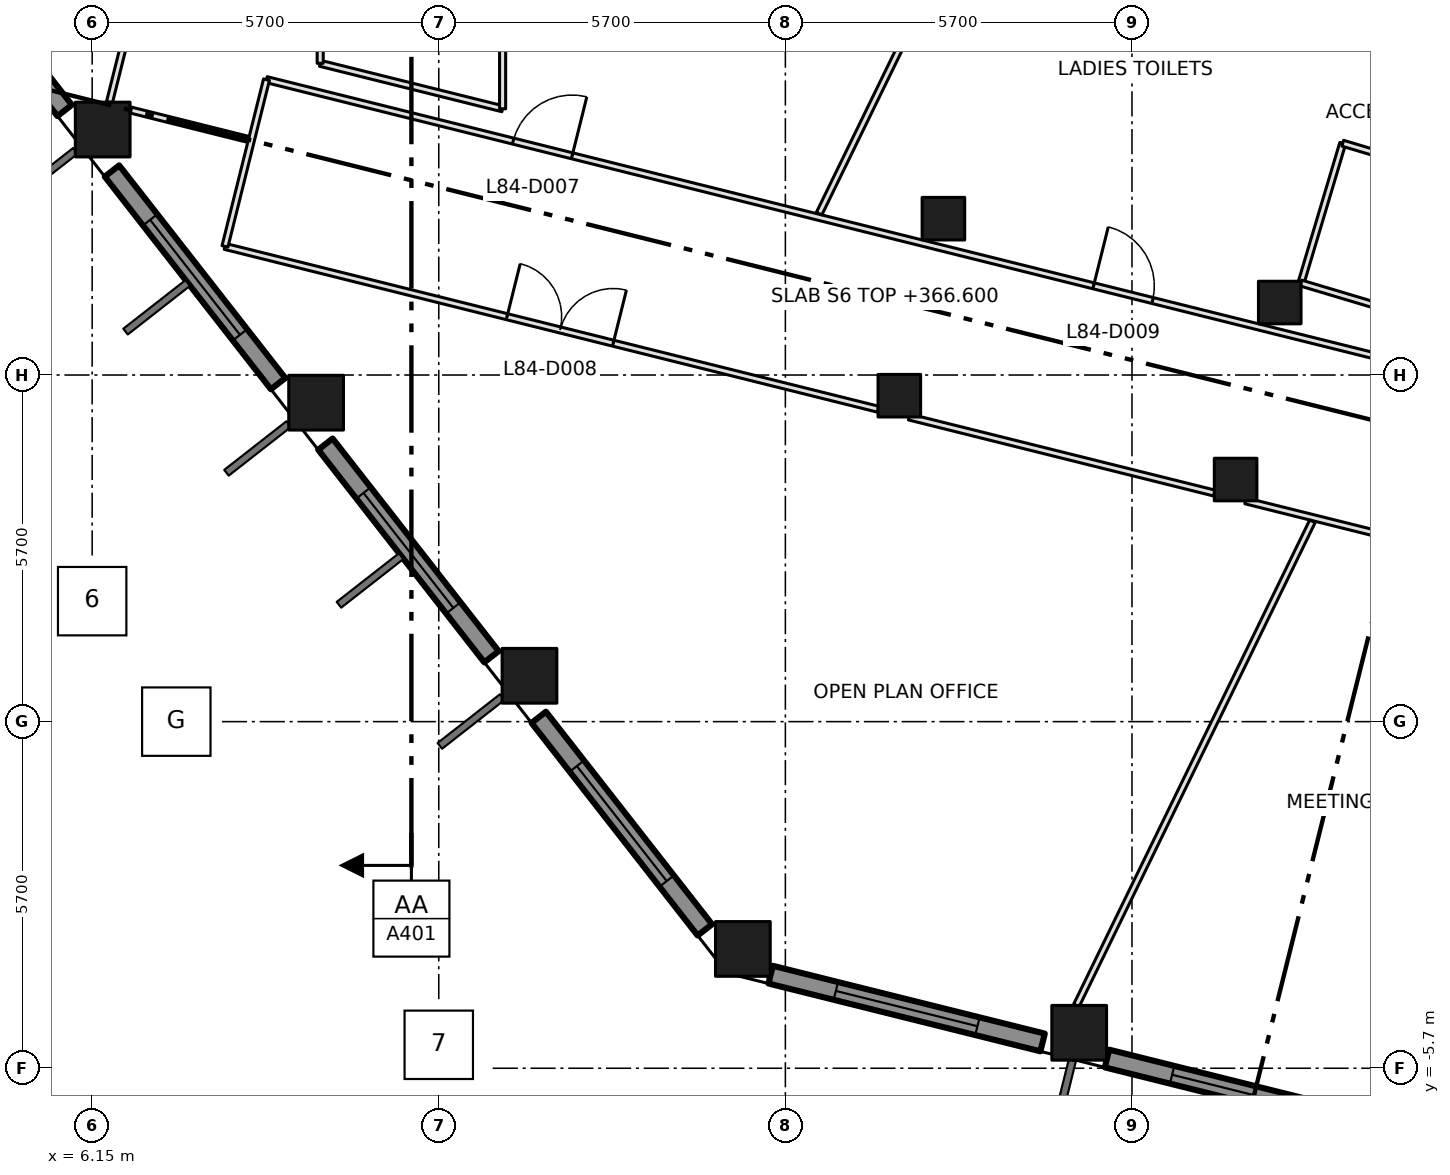
"""IFC4 building model, lengths in metres.
Left out: names, types, materials, properties, quantities, classifications, styles, units other than length and angle.
Written with IfcOpenShell. Run it as: python <this file> out.ifc"""

import sys

from ifc_helpers import new_model, si_unit, direction, frame, frame_2d, origin, origin_2d, place, context, subcontext, project, spatial, rectangle, extrude, element, fill, save


model = new_model("IFC4")
c1 = context("Model", 3, precision=1e-05, world=origin(), true_north=direction((0.0, 1.0)))
c2 = subcontext(c1, "Body", "Model", "MODEL_VIEW")
j1 = project(units=[si_unit("LENGTHUNIT", "METRE"), si_unit("PLANEANGLEUNIT", "RADIAN")], contexts=[c1])
p1 = place(None, origin())
s1 = spatial("IfcSite", under=j1, at=p1, CompositionType="ELEMENT")
p2 = place(p1, origin())
s2 = spatial("IfcBuilding", under=s1, at=p2, CompositionType="ELEMENT")
p3 = place(p2, frame((0.0, 0.0, 366.6)))
s3 = spatial("IfcBuildingStorey", under=s2, at=p3, CompositionType="ELEMENT", Elevation=366.6)
for number, where, z_axis, x_axis in (
    (1, (16.851, -3.738, 0.0), (0.0, 0.0, 1.0), (1.0, 0.0, 0.0)),
    (2, (13.342, 0.754, 0.0), (0.0, 0.0, 1.0), (1.0, 0.0, 0.0)),
    (3, (9.833, 5.245, 0.0), (0.0, 0.0, 1.0), (1.0, 0.0, 0.0)),
    (4, (6.323, 9.737, 0.0), (0.0, 0.0, 1.0), (1.0, 0.0, 0.0)),
    (5, (22.382, -5.117, 0.0), (0.0, 0.0, 1.0), (1.0, 0.0, 0.0)),
):
    element("IfcColumn", number, at=place(p3, frame(where, z_axis=z_axis, x_axis=x_axis)), inside=s3, PredefinedType="COLUMN", context=c2, shape_type="SweptSolid", body=[
        extrude(rectangle(XDim=0.9, YDim=0.9, at=origin_2d()), origin(), (0.0, 0.0, 1.0), 4.2),
    ])
for number, where, z_axis, x_axis in (
    (6, (19.424, 5.36, 0.0), (0.0, 0.0, 1.0), (1.0, 0.0, 0.0)),
    (7, (24.954, 3.981, 0.0), (0.0, 0.0, 1.0), (1.0, 0.0, 0.0)),
    (8, (20.149, 8.271, 0.0), (0.0, 0.0, 1.0), (1.0, 0.0, 0.0)),
    (9, (25.68, 6.892, 0.0), (0.0, 0.0, 1.0), (1.0, 0.0, 0.0)),
):
    element("IfcColumn", number, at=place(p3, frame(where, z_axis=z_axis, x_axis=x_axis)), inside=s3, PredefinedType="COLUMN", context=c2, shape_type="SweptSolid", body=[
        extrude(rectangle(XDim=0.7, YDim=0.7, at=origin_2d()), origin(), (0.0, 0.0, 1.0), 4.2),
    ])
p4 = place(p3, frame((2.967, 13.547, 0.0), z_axis=(0.0, 0.0, 1.0), x_axis=(0.615486001463, -0.788147817356, 0.0)))
e10 = element("IfcWall", 10, at=p4, inside=s3, PredefinedType="SOLIDWALL", context=c2, shape_type="SweptSolid", body=[
    extrude(rectangle(XDim=4.437, YDim=0.3, at=frame_2d((2.219, 0.0))), origin(), (0.0, 0.0, 1.0), 3.2),
])
p5 = place(p4, frame((1.018, 0.0, 0.8)))
e11 = element("IfcOpeningElement", 11, at=p5, cuts=e10, PredefinedType="OPENING", context=c2, shape_type="SweptSolid", body=[
    extrude(rectangle(XDim=2.4, YDim=2.1, at=frame_2d((1.2, 1.05))), frame((0.0, 0.16, 0.0), z_axis=(0.0, -1.0, 0.0), x_axis=(1.0, 0.0, 0.0)), (0.0, 0.0, 1.0), 0.32),
])
p6 = place(p3, frame((6.476, 9.055, 0.0), z_axis=(0.0, 0.0, 1.0), x_axis=(0.615649380255, -0.788020203162, 0.0)))
e12 = element("IfcWall", 12, at=p6, inside=s3, PredefinedType="SOLIDWALL", context=c2, shape_type="SweptSolid", body=[
    extrude(rectangle(XDim=4.438, YDim=0.3, at=frame_2d((2.219, 0.0))), origin(), (0.0, 0.0, 1.0), 3.2),
])
p7 = place(p6, frame((1.019, 0.0, 0.8)))
e13 = element("IfcOpeningElement", 13, at=p7, cuts=e12, PredefinedType="OPENING", context=c2, shape_type="SweptSolid", body=[
    extrude(rectangle(XDim=2.4, YDim=2.1, at=frame_2d((1.2, 1.05))), frame((0.0, 0.16, 0.0), z_axis=(0.0, -1.0, 0.0), x_axis=(1.0, 0.0, 0.0)), (0.0, 0.0, 1.0), 0.32),
])
p8 = place(p3, frame((9.986, 4.563, 0.0), z_axis=(0.0, 0.0, 1.0), x_axis=(0.615592779411, -0.788064419915, 0.0)))
e14 = element("IfcWall", 14, at=p8, inside=s3, PredefinedType="SOLIDWALL", context=c2, shape_type="SweptSolid", body=[
    extrude(rectangle(XDim=4.436, YDim=0.3, at=frame_2d((2.218, 0.0))), origin(), (0.0, 0.0, 1.0), 3.2),
])
p9 = place(p8, frame((1.018, 0.0, 0.8)))
e15 = element("IfcOpeningElement", 15, at=p9, cuts=e14, PredefinedType="OPENING", context=c2, shape_type="SweptSolid", body=[
    extrude(rectangle(XDim=2.4, YDim=2.1, at=frame_2d((1.2, 1.05))), frame((0.0, 0.16, 0.0), z_axis=(0.0, -1.0, 0.0), x_axis=(1.0, 0.0, 0.0)), (0.0, 0.0, 1.0), 0.32),
])
p10 = place(p3, frame((13.494, 0.071, 0.0), z_axis=(0.0, 0.0, 1.0), x_axis=(0.615763624226, -0.787930935476, 0.0)))
e16 = element("IfcWall", 16, at=p10, inside=s3, PredefinedType="SOLIDWALL", context=c2, shape_type="SweptSolid", body=[
    extrude(rectangle(XDim=4.437, YDim=0.3, at=frame_2d((2.219, 0.0))), origin(), (0.0, 0.0, 1.0), 3.2),
])
p11 = place(p10, frame((1.018, 0.0, 0.8)))
e17 = element("IfcOpeningElement", 17, at=p11, cuts=e16, PredefinedType="OPENING", context=c2, shape_type="SweptSolid", body=[
    extrude(rectangle(XDim=2.4, YDim=2.1, at=frame_2d((1.2, 1.05))), frame((0.0, 0.16, 0.0), z_axis=(0.0, -1.0, 0.0), x_axis=(1.0, 0.0, 0.0)), (0.0, 0.0, 1.0), 0.32),
])
p12 = place(p3, frame((17.308, -4.161, 0.0), z_axis=(0.0, 0.0, 1.0), x_axis=(0.970294992984, -0.241924836652, 0.0)))
e18 = element("IfcWall", 18, at=p12, inside=s3, PredefinedType="SOLIDWALL", context=c2, shape_type="SweptSolid", body=[
    extrude(rectangle(XDim=4.609, YDim=0.3, at=frame_2d((2.304, 0.0))), origin(), (0.0, 0.0, 1.0), 3.2),
])
p13 = place(p12, frame((1.105, 0.0, 0.8)))
e19 = element("IfcOpeningElement", 19, at=p13, cuts=e18, PredefinedType="OPENING", context=c2, shape_type="SweptSolid", body=[
    extrude(rectangle(XDim=2.4, YDim=2.1, at=frame_2d((1.2, 1.05))), frame((0.0, 0.16, 0.0), z_axis=(0.0, -1.0, 0.0), x_axis=(1.0, 0.0, 0.0)), (0.0, 0.0, 1.0), 0.32),
])
p14 = place(p3, frame((22.839, -5.54, 0.0), z_axis=(0.0, 0.0, 1.0), x_axis=(0.970282587769, -0.241974585177, 0.0)))
e20 = element("IfcWall", 20, at=p14, inside=s3, PredefinedType="SOLIDWALL", context=c2, shape_type="SweptSolid", body=[
    extrude(rectangle(XDim=4.608, YDim=0.3, at=frame_2d((2.304, 0.0))), origin(), (0.0, 0.0, 1.0), 3.2),
])
p15 = place(p14, frame((1.104, 0.0, 0.8)))
e21 = element("IfcOpeningElement", 21, at=p15, cuts=e20, PredefinedType="OPENING", context=c2, shape_type="SweptSolid", body=[
    extrude(rectangle(XDim=2.4, YDim=2.1, at=frame_2d((1.2, 1.05))), frame((0.0, 0.16, 0.0), z_axis=(0.0, -1.0, 0.0), x_axis=(1.0, 0.0, 0.0)), (0.0, 0.0, 1.0), 0.32),
])
p16 = place(p3, frame((8.334, 7.815, 0.0), z_axis=(0.0, 0.0, 1.0), x_axis=(0.970312231044, -0.241855688968, 0.0)))
e22 = element("IfcWall", 22, at=p16, inside=s3, PredefinedType="PARTITIONING", context=c2, shape_type="SweptSolid", body=[
    extrude(rectangle(XDim=11.069, YDim=0.1, at=frame_2d((5.534, 0.0))), origin(), (0.0, 0.0, 1.0), 3.9),
])
p17 = place(p16, frame((4.78, 0.0, 0.0)))
e23 = element("IfcOpeningElement", 23, at=p17, cuts=e22, PredefinedType="OPENING", context=c2, shape_type="SweptSolid", body=[
    extrude(rectangle(XDim=1.8, YDim=2.1, at=frame_2d((0.9, 1.05))), frame((0.0, 0.06, 0.0), z_axis=(0.0, -1.0, 0.0), x_axis=(1.0, 0.0, 0.0)), (0.0, 0.0, 1.0), 0.12),
])
p18 = place(p3, frame((9.017, 10.558, 0.0), z_axis=(0.0, 0.0, 1.0), x_axis=(0.970297621765, -0.241914293082, 0.0)))
e24 = element("IfcWall", 24, at=p18, inside=s3, PredefinedType="PARTITIONING", context=c2, shape_type="SweptSolid", body=[
    extrude(rectangle(XDim=19.879, YDim=0.1, at=frame_2d((9.94, 0.0))), origin(), (0.0, 0.0, 1.0), 3.9),
])
p19 = place(p18, frame((4.18, 0.0, 0.0)))
e25 = element("IfcOpeningElement", 25, at=p19, cuts=e24, PredefinedType="OPENING", context=c2, shape_type="SweptSolid", body=[
    extrude(rectangle(XDim=1.0, YDim=2.1, at=frame_2d((0.5, 1.05))), frame((0.0, 0.06, 0.0), z_axis=(0.0, -1.0, 0.0), x_axis=(1.0, 0.0, 0.0)), (0.0, 0.0, 1.0), 0.12),
])
p20 = place(p18, frame((14.018, 0.0, 0.0)))
e26 = element("IfcOpeningElement", 26, at=p20, cuts=e24, PredefinedType="OPENING", context=c2, shape_type="SweptSolid", body=[
    extrude(rectangle(XDim=1.0, YDim=2.1, at=frame_2d((0.5, 1.05))), frame((0.0, 0.06, 0.0), z_axis=(0.0, -1.0, 0.0), x_axis=(1.0, 0.0, 0.0)), (0.0, 0.0, 1.0), 0.12),
])
p21 = place(p3, frame((9.017, 10.558, 0.0), z_axis=(0.0, 0.0, 1.0), x_axis=(-0.241641419317, -0.970365613813, 0.0)))
e27 = element("IfcWall", 27, at=p21, inside=s3, PredefinedType="PARTITIONING", context=c2, shape_type="SweptSolid", body=[
    extrude(rectangle(XDim=2.827, YDim=0.1, at=frame_2d((1.414, 0.0))), origin(), (0.0, 0.0, 1.0), 3.9),
])
p22 = place(p3, frame((9.9, 10.826, 0.0), z_axis=(0.0, 0.0, 1.0), x_axis=(0.970290953223, -0.241941038466, 0.0)))
e28 = element("IfcWall", 28, at=p22, inside=s3, PredefinedType="PARTITIONING", context=c2, shape_type="SweptSolid", body=[
    extrude(rectangle(XDim=3.092, YDim=0.1, at=frame_2d((1.546, 0.0))), origin(), (0.0, 0.0, 1.0), 3.9),
])
p23 = place(p3, frame((9.9, 12.2, 0.0), z_axis=(0.0, 0.0, 1.0), x_axis=(0.0, -1.0, 0.0)))
e29 = element("IfcWall", 29, at=p23, inside=s3, PredefinedType="PARTITIONING", context=c2, shape_type="SweptSolid", body=[
    extrude(rectangle(XDim=1.374, YDim=0.1, at=frame_2d((0.687, 0.0))), origin(), (0.0, 0.0, 1.0), 3.9),
])
p24 = place(p3, frame((12.9, 10.078, 0.0), z_axis=(0.0, 0.0, 1.0), x_axis=(0.0, 1.0, 0.0)))
e30 = element("IfcWall", 30, at=p24, inside=s3, PredefinedType="PARTITIONING", context=c2, shape_type="SweptSolid", body=[
    extrude(rectangle(XDim=4.022, YDim=0.1, at=frame_2d((2.011, 0.0))), origin(), (0.0, 0.0, 1.0), 3.9),
])
p25 = place(p3, frame((19.586, 5.01, 0.0), z_axis=(0.0, 0.0, 1.0), x_axis=(0.970303347181, -0.241891327769, 0.0)))
e31 = element("IfcWall", 31, at=p25, inside=s3, PredefinedType="PARTITIONING", context=c2, shape_type="SweptSolid", body=[
    extrude(rectangle(XDim=5.172, YDim=0.1, at=frame_2d((2.586, 0.0))), origin(), (0.0, 0.0, 1.0), 3.9),
])
p26 = place(p3, frame((25.118, 3.631, 0.0), z_axis=(0.0, 0.0, 1.0), x_axis=(0.970281210621, -0.241980107272, 0.0)))
e32 = element("IfcWall", 32, at=p26, inside=s3, PredefinedType="PARTITIONING", context=c2, shape_type="SweptSolid", body=[
    extrude(rectangle(XDim=5.171, YDim=0.1, at=frame_2d((2.585, 0.0))), origin(), (0.0, 0.0, 1.0), 3.9),
])
p27 = place(p26, frame((2.629, 0.0, 0.0)))
e33 = element("IfcOpeningElement", 33, at=p27, cuts=e32, PredefinedType="OPENING", context=c2, shape_type="SweptSolid", body=[
    extrude(rectangle(XDim=1.0, YDim=2.1, at=frame_2d((0.5, 1.05))), frame((0.0, 0.06, 0.0), z_axis=(0.0, -1.0, 0.0), x_axis=(1.0, 0.0, 0.0)), (0.0, 0.0, 1.0), 0.12),
])
p28 = place(p3, frame((6.922, 12.138, 0.0), z_axis=(0.0, 0.0, 1.0), x_axis=(-0.24222136375, -0.97022101139, 0.0)))
e34 = element("IfcWall", 34, at=p28, inside=s3, PredefinedType="PARTITIONING", context=c2, shape_type="SweptSolid", body=[
    extrude(rectangle(XDim=2.011, YDim=0.1, at=frame_2d((1.005, 0.0))), origin(), (0.0, 0.0, 1.0), 3.9),
])
p29 = place(p3, frame((8.72, 9.574, 0.0), z_axis=(0.0, 0.0, 1.0), x_axis=(-0.970221168815, 0.24222073318, 0.0)))
e35 = element("IfcWall", 35, at=p29, inside=s3, PredefinedType="PARTITIONING", context=c2, shape_type="SweptSolid", body=[
    extrude(rectangle(XDim=2.007, YDim=0.1, at=frame_2d((1.003, 0.0))), origin(), (0.0, 0.0, 1.0), 3.9),
])
p30 = place(p3, frame((18.105, 8.354, 0.0), z_axis=(0.0, 0.0, 1.0), x_axis=(0.438424384383, 0.898768078638, 0.0)))
e36 = element("IfcWall", 36, at=p30, inside=s3, PredefinedType="PARTITIONING", context=c2, shape_type="SweptSolid", body=[
    extrude(rectangle(XDim=6.393, YDim=0.1, at=frame_2d((3.197, 0.0))), origin(), (0.0, 0.0, 1.0), 3.9),
])
p31 = place(p3, frame((22.336, -4.667, 0.0), z_axis=(0.0, 0.0, 1.0), x_axis=(0.438261260169, 0.89884763327, 0.0)))
e37 = element("IfcWall", 37, at=p31, inside=s3, PredefinedType="PARTITIONING", context=c2, shape_type="SweptSolid", body=[
    extrude(rectangle(XDim=8.858, YDim=0.1, at=frame_2d((4.429, 0.0))), origin(), (0.0, 0.0, 1.0), 3.9),
])
p32 = place(p3, frame((26.03, 7.214, 0.0), z_axis=(0.0, 0.0, 1.0), x_axis=(0.286077381682, 0.958206518288, 0.0)))
e38 = element("IfcWall", 38, at=p32, inside=s3, PredefinedType="PARTITIONING", context=c2, shape_type="SweptSolid", body=[
    extrude(rectangle(XDim=2.398, YDim=0.1, at=frame_2d((1.199, 0.0))), origin(), (0.0, 0.0, 1.0), 3.9),
])
p33 = place(p3, frame((26.716, 9.512, 0.0), z_axis=(0.0, 0.0, 1.0), x_axis=(0.958168093169, -0.286206053804, 0.0)))
e39 = element("IfcWall", 39, at=p33, inside=s3, PredefinedType="PARTITIONING", context=c2, shape_type="SweptSolid", body=[
    extrude(rectangle(XDim=2.551, YDim=0.1, at=frame_2d((1.275, 0.0))), origin(), (0.0, 0.0, 1.0), 3.9),
])
p34 = place(p3, frame((28.473, 6.482, 0.0), z_axis=(0.0, 0.0, 1.0), x_axis=(-0.958136712348, 0.286311090338, 0.0)))
e40 = element("IfcWall", 40, at=p34, inside=s3, PredefinedType="PARTITIONING", context=c2, shape_type="SweptSolid", body=[
    extrude(rectangle(XDim=2.55, YDim=0.1, at=frame_2d((1.275, 0.0))), origin(), (0.0, 0.0, 1.0), 3.9),
])
p35 = place(p7, origin())
e41 = element("IfcWindow", 41, at=p35, inside=s3, PartitioningType="DOUBLE_PANEL_VERTICAL", PredefinedType="WINDOW", context=c2, shape_type="SweptSolid", body=[
    extrude(rectangle(XDim=2.4, YDim=2.1, at=frame_2d((1.2, 1.05))), frame((0.0, 0.03, 0.0), z_axis=(0.0, -1.0, 0.0), x_axis=(1.0, 0.0, 0.0)), (0.0, 0.0, 1.0), 0.06),
])
fill(e13, e41)
p36 = place(p9, origin())
e42 = element("IfcWindow", 42, at=p36, inside=s3, PartitioningType="DOUBLE_PANEL_VERTICAL", PredefinedType="WINDOW", context=c2, shape_type="SweptSolid", body=[
    extrude(rectangle(XDim=2.4, YDim=2.1, at=frame_2d((1.2, 1.05))), frame((0.0, 0.03, 0.0), z_axis=(0.0, -1.0, 0.0), x_axis=(1.0, 0.0, 0.0)), (0.0, 0.0, 1.0), 0.06),
])
fill(e15, e42)
p37 = place(p11, origin())
e43 = element("IfcWindow", 43, at=p37, inside=s3, PartitioningType="DOUBLE_PANEL_VERTICAL", PredefinedType="WINDOW", context=c2, shape_type="SweptSolid", body=[
    extrude(rectangle(XDim=2.4, YDim=2.1, at=frame_2d((1.2, 1.05))), frame((0.0, 0.03, 0.0), z_axis=(0.0, -1.0, 0.0), x_axis=(1.0, 0.0, 0.0)), (0.0, 0.0, 1.0), 0.06),
])
fill(e17, e43)
p38 = place(p13, origin())
e44 = element("IfcWindow", 44, at=p38, inside=s3, PartitioningType="DOUBLE_PANEL_VERTICAL", PredefinedType="WINDOW", context=c2, shape_type="SweptSolid", body=[
    extrude(rectangle(XDim=2.4, YDim=2.1, at=frame_2d((1.2, 1.05))), frame((0.0, 0.03, 0.0), z_axis=(0.0, -1.0, 0.0), x_axis=(1.0, 0.0, 0.0)), (0.0, 0.0, 1.0), 0.06),
])
fill(e19, e44)
p39 = place(p15, origin())
e45 = element("IfcWindow", 45, at=p39, inside=s3, PartitioningType="DOUBLE_PANEL_VERTICAL", PredefinedType="WINDOW", context=c2, shape_type="SweptSolid", body=[
    extrude(rectangle(XDim=2.4, YDim=2.1, at=frame_2d((1.2, 1.05))), frame((0.0, 0.03, 0.0), z_axis=(0.0, -1.0, 0.0), x_axis=(1.0, 0.0, 0.0)), (0.0, 0.0, 1.0), 0.06),
])
fill(e21, e45)
p40 = place(p19, origin())
e46 = element("IfcDoor", 46, at=p40, inside=s3, OperationType="SINGLE_SWING_RIGHT", PredefinedType="DOOR", context=c2, shape_type="SweptSolid", body=[
    extrude(rectangle(XDim=1.0, YDim=2.1, at=frame_2d((0.5, 1.05))), frame((0.0, 0.025, 0.0), z_axis=(0.0, -1.0, 0.0), x_axis=(1.0, 0.0, 0.0)), (0.0, 0.0, 1.0), 0.05),
])
fill(e25, e46)
p41 = place(p17, origin())
e47 = element("IfcDoor", 47, at=p41, inside=s3, OperationType="DOUBLE_DOOR_SINGLE_SWING", PredefinedType="DOOR", context=c2, shape_type="SweptSolid", body=[
    extrude(rectangle(XDim=1.8, YDim=2.1, at=frame_2d((0.9, 1.05))), frame((0.0, 0.025, 0.0), z_axis=(0.0, -1.0, 0.0), x_axis=(1.0, 0.0, 0.0)), (0.0, 0.0, 1.0), 0.05),
])
fill(e23, e47)
p42 = place(p20, origin())
e48 = element("IfcDoor", 48, at=p42, inside=s3, OperationType="SINGLE_SWING_LEFT", PredefinedType="DOOR", context=c2, shape_type="SweptSolid", body=[
    extrude(rectangle(XDim=1.0, YDim=2.1, at=frame_2d((0.5, 1.05))), frame((0.0, 0.025, 0.0), z_axis=(0.0, -1.0, 0.0), x_axis=(1.0, 0.0, 0.0)), (0.0, 0.0, 1.0), 0.05),
])
fill(e26, e48)
save(model, sys.argv[1])
